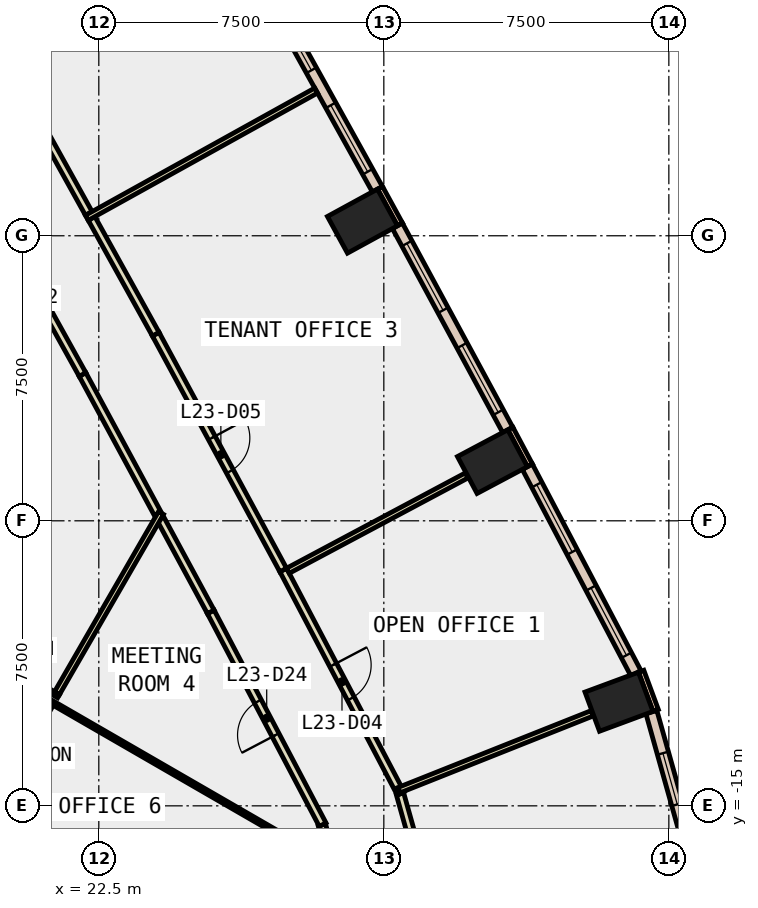
"""IFC4 building model, lengths in metres.
Left out: names, types, materials, properties, quantities, classifications, styles, units other than length and angle.
Written with IfcOpenShell. Run it as: python <this file> out.ifc"""

import sys

from ifc_helpers import new_model, si_unit, direction, frame, frame_2d, origin, origin_2d, place, context, subcontext, project, spatial, rectangle, extrude, element, fill, save


model = new_model("IFC4")
c1 = context("Model", 3, precision=1e-05, world=origin(), true_north=direction((0.0, 1.0)))
c2 = subcontext(c1, "Body", "Model", "MODEL_VIEW")
j1 = project(units=[si_unit("LENGTHUNIT", "METRE"), si_unit("PLANEANGLEUNIT", "RADIAN")], contexts=[c1])
p1 = place(None, origin())
s1 = spatial("IfcSite", under=j1, at=p1, CompositionType="ELEMENT")
p2 = place(p1, origin())
s2 = spatial("IfcBuilding", under=s1, at=p2, CompositionType="ELEMENT")
p3 = place(p2, frame((0.0, 0.0, 107.6)))
s3 = spatial("IfcBuildingStorey", under=s2, at=p3, CompositionType="ELEMENT", Elevation=107.6)
for number, where, z_axis, x_axis in (
    (1, (36.188, -12.261, -0.4), (0.0, 0.0, 1.0), (-0.347, 0.938, 0.0)),
    (2, (32.858, -5.943, -0.4), (0.0, 0.0, 1.0), (-0.469, 0.883, 0.0)),
    (3, (29.438, 0.385, -0.4), (0.0, 0.0, 1.0), (-0.48, 0.877, 0.0)),
):
    element("IfcColumn", number, at=place(p3, frame(where, z_axis=z_axis, x_axis=x_axis)), inside=s3, PredefinedType="COLUMN", context=c2, shape_type="SweptSolid", body=[
        extrude(rectangle(XDim=1.1, YDim=1.5, at=origin_2d()), origin(), (0.0, 0.0, 1.0), 4.2),
    ])
p4 = place(p3, frame((37.153, -12.49, 0.0), z_axis=(0.0, 0.0, 1.0), x_axis=(-0.347205967468, 0.937788897436, 0.0)))
e4 = element("IfcWall", 4, at=p4, inside=s3, PredefinedType="STANDARD", context=c2, shape_type="SweptSolid", body=[
    extrude(rectangle(XDim=1.1, YDim=0.15, at=frame_2d((0.55, 0.0))), origin(), (0.0, 0.0, 1.0), 3.8),
])
p5 = place(p3, frame((33.845, -6.042, 0.0), z_axis=(0.0, 0.0, 1.0), x_axis=(-0.46919310775, 0.883095593716, 0.0)))
e5 = element("IfcWall", 5, at=p5, inside=s3, PredefinedType="STANDARD", context=c2, shape_type="SweptSolid", body=[
    extrude(rectangle(XDim=1.099, YDim=0.15, at=frame_2d((0.55, 0.0))), origin(), (0.0, 0.0, 1.0), 3.8),
])
p6 = place(p3, frame((30.426, 0.298, 0.0), z_axis=(0.0, 0.0, 1.0), x_axis=(-0.479737645119, 0.877411985247, 0.0)))
e6 = element("IfcWall", 6, at=p6, inside=s3, PredefinedType="STANDARD", context=c2, shape_type="SweptSolid", body=[
    extrude(rectangle(XDim=1.101, YDim=0.15, at=frame_2d((0.55, 0.0))), origin(), (0.0, 0.0, 1.0), 3.8),
])
p7 = place(p3, frame((38.026, -16.046, 0.0), z_axis=(0.0, 0.0, 1.0), x_axis=(-0.270054089595, 0.96284515302, 0.0)))
e7 = element("IfcWall", 7, at=p7, inside=s3, PredefinedType="STANDARD", context=c2, shape_type="SweptSolid", body=[
    extrude(rectangle(XDim=3.651, YDim=0.3, at=frame_2d((1.825, 0.0))), origin(), (0.0, 0.0, 1.0), 3.8),
])
p8 = place(p7, frame((1.125, 0.0, 0.9)))
e8 = element("IfcOpeningElement", 8, at=p8, cuts=e7, PredefinedType="OPENING", context=c2, shape_type="SweptSolid", body=[
    extrude(rectangle(XDim=1.4, YDim=2.6, at=frame_2d((0.7, 1.3))), frame((0.0, 0.16, 0.0), z_axis=(0.0, -1.0, 0.0), x_axis=(1.0, 0.0, 0.0)), (0.0, 0.0, 1.0), 0.32),
])
p9 = place(p3, frame((36.633, -11.511, 0.0), z_axis=(0.0, 0.0, 1.0), x_axis=(-0.465380908665, 0.88511050714, 0.0)))
e9 = element("IfcWall", 9, at=p9, inside=s3, PredefinedType="STANDARD", context=c2, shape_type="SweptSolid", body=[
    extrude(rectangle(XDim=6.139, YDim=0.3, at=frame_2d((3.07, 0.0))), origin(), (0.0, 0.0, 1.0), 3.8),
])
p10 = place(p9, frame((0.535, 0.0, 0.9)))
e10 = element("IfcOpeningElement", 10, at=p10, cuts=e9, PredefinedType="OPENING", context=c2, shape_type="SweptSolid", body=[
    extrude(rectangle(XDim=2.0, YDim=2.6, at=frame_2d((1.0, 1.3))), frame((0.0, 0.16, 0.0), z_axis=(0.0, -1.0, 0.0), x_axis=(1.0, 0.0, 0.0)), (0.0, 0.0, 1.0), 0.32),
])
p11 = place(p9, frame((3.604, 0.0, 0.9)))
e11 = element("IfcOpeningElement", 11, at=p11, cuts=e9, PredefinedType="OPENING", context=c2, shape_type="SweptSolid", body=[
    extrude(rectangle(XDim=2.0, YDim=2.6, at=frame_2d((1.0, 1.3))), frame((0.0, 0.16, 0.0), z_axis=(0.0, -1.0, 0.0), x_axis=(1.0, 0.0, 0.0)), (0.0, 0.0, 1.0), 0.32),
])
p12 = place(p3, frame((33.26, -5.108, 0.0), z_axis=(0.0, 0.0, 1.0), x_axis=(-0.475573079782, 0.879676216449, 0.0)))
e12 = element("IfcWall", 12, at=p12, inside=s3, PredefinedType="STANDARD", context=c2, shape_type="SweptSolid", body=[
    extrude(rectangle(XDim=6.104, YDim=0.3, at=frame_2d((3.052, 0.0))), origin(), (0.0, 0.0, 1.0), 3.8),
])
p13 = place(p12, frame((0.526, 0.0, 0.9)))
e13 = element("IfcOpeningElement", 13, at=p13, cuts=e12, PredefinedType="OPENING", context=c2, shape_type="SweptSolid", body=[
    extrude(rectangle(XDim=2.0, YDim=2.6, at=frame_2d((1.0, 1.3))), frame((0.0, 0.16, 0.0), z_axis=(0.0, -1.0, 0.0), x_axis=(1.0, 0.0, 0.0)), (0.0, 0.0, 1.0), 0.32),
])
p14 = place(p12, frame((3.578, 0.0, 0.9)))
e14 = element("IfcOpeningElement", 14, at=p14, cuts=e12, PredefinedType="OPENING", context=c2, shape_type="SweptSolid", body=[
    extrude(rectangle(XDim=2.0, YDim=2.6, at=frame_2d((1.0, 1.3))), frame((0.0, 0.16, 0.0), z_axis=(0.0, -1.0, 0.0), x_axis=(1.0, 0.0, 0.0)), (0.0, 0.0, 1.0), 0.32),
])
p15 = place(p3, frame((29.83, 1.225, 0.0), z_axis=(0.0, 0.0, 1.0), x_axis=(-0.485170774404, 0.874419418623, 0.0)))
e15 = element("IfcWall", 15, at=p15, inside=s3, PredefinedType="STANDARD", context=c2, shape_type="SweptSolid", body=[
    extrude(rectangle(XDim=6.103, YDim=0.3, at=frame_2d((3.052, 0.0))), origin(), (0.0, 0.0, 1.0), 3.8),
])
p16 = place(p15, frame((0.526, 0.0, 0.9)))
e16 = element("IfcOpeningElement", 16, at=p16, cuts=e15, PredefinedType="OPENING", context=c2, shape_type="SweptSolid", body=[
    extrude(rectangle(XDim=2.0, YDim=2.6, at=frame_2d((1.0, 1.3))), frame((0.0, 0.16, 0.0), z_axis=(0.0, -1.0, 0.0), x_axis=(1.0, 0.0, 0.0)), (0.0, 0.0, 1.0), 0.32),
])
p17 = place(p15, frame((3.578, 0.0, 0.9)))
e17 = element("IfcOpeningElement", 17, at=p17, cuts=e15, PredefinedType="OPENING", context=c2, shape_type="SweptSolid", body=[
    extrude(rectangle(XDim=2.0, YDim=2.6, at=frame_2d((1.0, 1.3))), frame((0.0, 0.16, 0.0), z_axis=(0.0, -1.0, 0.0), x_axis=(1.0, 0.0, 0.0)), (0.0, 0.0, 1.0), 0.32),
])
p18 = place(p3, frame((24.051, -7.315, 0.0), z_axis=(0.0, 0.0, 1.0), x_axis=(-0.475308630647, 0.87981913234, 0.0)))
e18 = element("IfcWall", 18, at=p18, inside=s3, PredefinedType="PARTITIONING", context=c2, shape_type="SweptSolid", body=[
    extrude(rectangle(XDim=4.166, YDim=0.2, at=frame_2d((2.083, 0.0))), origin(), (0.0, 0.0, 1.0), 3.8),
])
p19 = place(p3, frame((22.071, -3.65, 0.0), z_axis=(0.0, 0.0, 1.0), x_axis=(-0.485198988697, 0.874403763354, 0.0)))
e19 = element("IfcWall", 19, at=p19, inside=s3, PredefinedType="PARTITIONING", context=c2, shape_type="SweptSolid", body=[
    extrude(rectangle(XDim=7.098, YDim=0.2, at=frame_2d((3.549, 0.0))), origin(), (0.0, 0.0, 1.0), 3.8),
])
p20 = place(p19, frame((3.049, 0.0, 0.0)))
e20 = element("IfcOpeningElement", 20, at=p20, cuts=e19, PredefinedType="OPENING", context=c2, shape_type="SweptSolid", body=[
    extrude(rectangle(XDim=1.0, YDim=2.1, at=frame_2d((0.5, 1.05))), frame((0.0, 0.11, 0.0), z_axis=(0.0, -1.0, 0.0), x_axis=(1.0, 0.0, 0.0)), (0.0, 0.0, 1.0), 0.22),
])
p21 = place(p3, frame((28.662, -16.541, 0.0), z_axis=(0.0, 0.0, 1.0), x_axis=(-0.270771802087, 0.96264356394, 0.0)))
e21 = element("IfcWall", 21, at=p21, inside=s3, PredefinedType="PARTITIONING", context=c2, shape_type="SweptSolid", body=[
    extrude(rectangle(XDim=1.078, YDim=0.2, at=frame_2d((0.539, 0.0))), origin(), (0.0, 0.0, 1.0), 3.8),
])
p22 = place(p3, frame((28.39, -15.495, 0.0), z_axis=(0.0, 0.0, 1.0), x_axis=(-0.465367816287, 0.885117390838, 0.0)))
e22 = element("IfcWall", 22, at=p22, inside=s3, PredefinedType="PARTITIONING", context=c2, shape_type="SweptSolid", body=[
    extrude(rectangle(XDim=6.326, YDim=0.2, at=frame_2d((3.163, 0.0))), origin(), (0.0, 0.0, 1.0), 3.8),
])
p23 = place(p22, frame((2.663, 0.0, 0.0)))
e23 = element("IfcOpeningElement", 23, at=p23, cuts=e22, PredefinedType="OPENING", context=c2, shape_type="SweptSolid", body=[
    extrude(rectangle(XDim=1.0, YDim=2.1, at=frame_2d((0.5, 1.05))), frame((0.0, 0.11, 0.0), z_axis=(0.0, -1.0, 0.0), x_axis=(1.0, 0.0, 0.0)), (0.0, 0.0, 1.0), 0.22),
])
p24 = place(p3, frame((25.446, -9.896, 0.0), z_axis=(0.0, 0.0, 1.0), x_axis=(-0.475427182652, 0.879755076141, 0.0)))
e24 = element("IfcWall", 24, at=p24, inside=s3, PredefinedType="PARTITIONING", context=c2, shape_type="SweptSolid", body=[
    extrude(rectangle(XDim=2.785, YDim=0.2, at=frame_2d((1.393, 0.0))), origin(), (0.0, 0.0, 1.0), 3.8),
])
p25 = place(p3, frame((30.426, -14.685, 0.0), z_axis=(0.0, 0.0, 1.0), x_axis=(0.270131711391, -0.962823378664, 0.0)))
e25 = element("IfcWall", 25, at=p25, inside=s3, PredefinedType="PARTITIONING", context=c2, shape_type="SweptSolid", body=[
    extrude(rectangle(XDim=2.166, YDim=0.2, at=frame_2d((1.083, 0.0))), origin(), (0.0, 0.0, 1.0), 3.8),
])
p26 = place(p3, frame((27.353, -8.794, 0.0), z_axis=(0.0, 0.0, 1.0), x_axis=(0.465239168813, -0.885185017836, 0.0)))
e26 = element("IfcWall", 26, at=p26, inside=s3, PredefinedType="PARTITIONING", context=c2, shape_type="SweptSolid", body=[
    extrude(rectangle(XDim=6.646, YDim=0.2, at=frame_2d((3.323, 0.0))), origin(), (0.0, 0.0, 1.0), 3.8),
])
p27 = place(p26, frame((2.823, 0.0, 0.0)))
e27 = element("IfcOpeningElement", 27, at=p27, cuts=e26, PredefinedType="OPENING", context=c2, shape_type="SweptSolid", body=[
    extrude(rectangle(XDim=1.0, YDim=2.1, at=frame_2d((0.5, 1.05))), frame((0.0, 0.11, 0.0), z_axis=(0.0, -1.0, 0.0), x_axis=(1.0, 0.0, 0.0)), (0.0, 0.0, 1.0), 0.22),
])
p28 = place(p3, frame((22.309, 0.456, 0.0), z_axis=(0.0, 0.0, 1.0), x_axis=(0.484982854201, -0.87452365956, 0.0)))
e28 = element("IfcWall", 28, at=p28, inside=s3, PredefinedType="PARTITIONING", context=c2, shape_type="SweptSolid", body=[
    extrude(rectangle(XDim=3.487, YDim=0.2, at=frame_2d((1.743, 0.0))), origin(), (0.0, 0.0, 1.0), 3.8),
])
p29 = place(p3, frame((24.0, -2.593, 0.0), z_axis=(0.0, 0.0, 1.0), x_axis=(0.475480817472, -0.879726089312, 0.0)))
e29 = element("IfcWall", 29, at=p29, inside=s3, PredefinedType="PARTITIONING", context=c2, shape_type="SweptSolid", body=[
    extrude(rectangle(XDim=7.05, YDim=0.2, at=frame_2d((3.525, 0.0))), origin(), (0.0, 0.0, 1.0), 3.8),
])
p30 = place(p29, frame((3.1, 0.0, 0.0)))
e30 = element("IfcOpeningElement", 30, at=p30, cuts=e29, PredefinedType="OPENING", context=c2, shape_type="SweptSolid", body=[
    extrude(rectangle(XDim=1.0, YDim=2.1, at=frame_2d((0.5, 1.05))), frame((0.0, 0.11, 0.0), z_axis=(0.0, -1.0, 0.0), x_axis=(1.0, 0.0, 0.0)), (0.0, 0.0, 1.0), 0.22),
])
p31 = place(p3, frame((20.544, 3.636, 0.0), z_axis=(0.0, 0.0, 1.0), x_axis=(0.485250552989, -0.874375148792, 0.0)))
e31 = element("IfcWall", 31, at=p31, inside=s3, PredefinedType="PARTITIONING", context=c2, shape_type="SweptSolid", body=[
    extrude(rectangle(XDim=3.487, YDim=0.2, at=frame_2d((1.744, 0.0))), origin(), (0.0, 0.0, 1.0), 3.8),
])
p32 = place(p3, frame((17.219, -9.676, 0.0), z_axis=(0.0, 0.0, 1.0), x_axis=(0.86598459596, -0.500070674565, 0.0)))
e32 = element("IfcWall", 32, at=p32, inside=s3, PredefinedType="PARTITIONING", context=c2, shape_type="SweptSolid", body=[
    extrude(rectangle(XDim=4.875, YDim=0.1, at=frame_2d((2.438, 0.0))), origin(), (0.0, 0.0, 1.0), 3.8),
])
p33 = place(p3, frame((21.236, -12.319, 0.0), z_axis=(0.0, 0.0, 1.0), x_axis=(-0.500016488359, -0.866015884017, 0.0)))
e33 = element("IfcWall", 33, at=p33, inside=s3, PredefinedType="PARTITIONING", context=c2, shape_type="SweptSolid", body=[
    extrude(rectangle(XDim=5.702, YDim=0.15, at=frame_2d((2.851, 0.0))), origin(), (0.0, 0.0, 1.0), 3.8),
])
p34 = place(p3, frame((24.137, -7.294, 0.0), z_axis=(0.0, 0.0, 1.0), x_axis=(-0.500001804394, -0.866024362014, 0.0)))
e34 = element("IfcWall", 34, at=p34, inside=s3, PredefinedType="PARTITIONING", context=c2, shape_type="SweptSolid", body=[
    extrude(rectangle(XDim=5.472, YDim=0.15, at=frame_2d((2.736, 0.0))), origin(), (0.0, 0.0, 1.0), 3.8),
])
p35 = place(p3, frame((21.196, -12.238, 0.0), z_axis=(0.0, 0.0, 1.0), x_axis=(0.866023145199, -0.500003911965, 0.0)))
e35 = element("IfcWall", 35, at=p35, inside=s3, PredefinedType="PARTITIONING", context=c2, shape_type="SweptSolid", body=[
    extrude(rectangle(XDim=8.71, YDim=0.1, at=frame_2d((4.355, 0.0))), origin(), (0.0, 0.0, 1.0), 3.8),
])
p36 = place(p3, frame((30.399, -14.588, 0.0), z_axis=(0.0, 0.0, 1.0), x_axis=(0.92913411584, 0.36974287658, 0.0)))
e36 = element("IfcWall", 36, at=p36, inside=s3, PredefinedType="PARTITIONING", context=c2, shape_type="SweptSolid", body=[
    extrude(rectangle(XDim=5.469, YDim=0.15, at=frame_2d((2.734, 0.0))), origin(), (0.0, 0.0, 1.0), 3.8),
])
p37 = place(p3, frame((27.476, -8.814, 0.0), z_axis=(0.0, 0.0, 1.0), x_axis=(0.882440424847, 0.47042416668, 0.0)))
e37 = element("IfcWall", 37, at=p37, inside=s3, PredefinedType="PARTITIONING", context=c2, shape_type="SweptSolid", body=[
    extrude(rectangle(XDim=5.329, YDim=0.15, at=frame_2d((2.665, 0.0))), origin(), (0.0, 0.0, 1.0), 3.8),
])
p38 = place(p3, frame((22.185, 0.473, 0.0), z_axis=(0.0, 0.0, 1.0), x_axis=(0.874372498137, 0.485255329184, 0.0)))
e38 = element("IfcWall", 38, at=p38, inside=s3, PredefinedType="PARTITIONING", context=c2, shape_type="SweptSolid", body=[
    extrude(rectangle(XDim=6.9, YDim=0.15, at=frame_2d((3.45, 0.0))), origin(), (0.0, 0.0, 1.0), 3.8),
])
p39 = place(p8, origin())
e39 = element("IfcWindow", 39, at=p39, inside=s3, PartitioningType="SINGLE_PANEL", PredefinedType="WINDOW", context=c2, shape_type="SweptSolid", body=[
    extrude(rectangle(XDim=1.4, YDim=2.6, at=frame_2d((0.7, 1.3))), frame((0.0, 0.03, 0.0), z_axis=(0.0, -1.0, 0.0), x_axis=(1.0, 0.0, 0.0)), (0.0, 0.0, 1.0), 0.06),
])
fill(e8, e39)
p40 = place(p10, origin())
e40 = element("IfcWindow", 40, at=p40, inside=s3, PartitioningType="SINGLE_PANEL", PredefinedType="WINDOW", context=c2, shape_type="SweptSolid", body=[
    extrude(rectangle(XDim=2.0, YDim=2.6, at=frame_2d((1.0, 1.3))), frame((0.0, 0.03, 0.0), z_axis=(0.0, -1.0, 0.0), x_axis=(1.0, 0.0, 0.0)), (0.0, 0.0, 1.0), 0.06),
])
fill(e10, e40)
p41 = place(p11, origin())
e41 = element("IfcWindow", 41, at=p41, inside=s3, PartitioningType="SINGLE_PANEL", PredefinedType="WINDOW", context=c2, shape_type="SweptSolid", body=[
    extrude(rectangle(XDim=2.0, YDim=2.6, at=frame_2d((1.0, 1.3))), frame((0.0, 0.03, 0.0), z_axis=(0.0, -1.0, 0.0), x_axis=(1.0, 0.0, 0.0)), (0.0, 0.0, 1.0), 0.06),
])
fill(e11, e41)
p42 = place(p13, origin())
e42 = element("IfcWindow", 42, at=p42, inside=s3, PartitioningType="SINGLE_PANEL", PredefinedType="WINDOW", context=c2, shape_type="SweptSolid", body=[
    extrude(rectangle(XDim=2.0, YDim=2.6, at=frame_2d((1.0, 1.3))), frame((0.0, 0.03, 0.0), z_axis=(0.0, -1.0, 0.0), x_axis=(1.0, 0.0, 0.0)), (0.0, 0.0, 1.0), 0.06),
])
fill(e13, e42)
p43 = place(p14, origin())
e43 = element("IfcWindow", 43, at=p43, inside=s3, PartitioningType="SINGLE_PANEL", PredefinedType="WINDOW", context=c2, shape_type="SweptSolid", body=[
    extrude(rectangle(XDim=2.0, YDim=2.6, at=frame_2d((1.0, 1.3))), frame((0.0, 0.03, 0.0), z_axis=(0.0, -1.0, 0.0), x_axis=(1.0, 0.0, 0.0)), (0.0, 0.0, 1.0), 0.06),
])
fill(e14, e43)
p44 = place(p16, origin())
e44 = element("IfcWindow", 44, at=p44, inside=s3, PartitioningType="SINGLE_PANEL", PredefinedType="WINDOW", context=c2, shape_type="SweptSolid", body=[
    extrude(rectangle(XDim=2.0, YDim=2.6, at=frame_2d((1.0, 1.3))), frame((0.0, 0.03, 0.0), z_axis=(0.0, -1.0, 0.0), x_axis=(1.0, 0.0, 0.0)), (0.0, 0.0, 1.0), 0.06),
])
fill(e16, e44)
p45 = place(p17, origin())
e45 = element("IfcWindow", 45, at=p45, inside=s3, PartitioningType="SINGLE_PANEL", PredefinedType="WINDOW", context=c2, shape_type="SweptSolid", body=[
    extrude(rectangle(XDim=2.0, YDim=2.6, at=frame_2d((1.0, 1.3))), frame((0.0, 0.03, 0.0), z_axis=(0.0, -1.0, 0.0), x_axis=(1.0, 0.0, 0.0)), (0.0, 0.0, 1.0), 0.06),
])
fill(e17, e45)
p46 = place(p27, origin())
e46 = element("IfcDoor", 46, at=p46, inside=s3, OperationType="SINGLE_SWING_LEFT", PredefinedType="DOOR", context=c2, shape_type="SweptSolid", body=[
    extrude(rectangle(XDim=1.0, YDim=2.1, at=frame_2d((0.5, 1.05))), frame((0.0, 0.025, 0.0), z_axis=(0.0, -1.0, 0.0), x_axis=(1.0, 0.0, 0.0)), (0.0, 0.0, 1.0), 0.05),
])
fill(e27, e46)
p47 = place(p30, origin())
e47 = element("IfcDoor", 47, at=p47, inside=s3, OperationType="SINGLE_SWING_LEFT", PredefinedType="DOOR", context=c2, shape_type="SweptSolid", body=[
    extrude(rectangle(XDim=1.0, YDim=2.1, at=frame_2d((0.5, 1.05))), frame((0.0, 0.025, 0.0), z_axis=(0.0, -1.0, 0.0), x_axis=(1.0, 0.0, 0.0)), (0.0, 0.0, 1.0), 0.05),
])
fill(e30, e47)
p48 = place(p23, origin())
e48 = element("IfcDoor", 48, at=p48, inside=s3, OperationType="SINGLE_SWING_LEFT", PredefinedType="DOOR", context=c2, shape_type="SweptSolid", body=[
    extrude(rectangle(XDim=1.0, YDim=2.1, at=frame_2d((0.5, 1.05))), frame((0.0, 0.025, 0.0), z_axis=(0.0, -1.0, 0.0), x_axis=(1.0, 0.0, 0.0)), (0.0, 0.0, 1.0), 0.05),
])
fill(e23, e48)
save(model, sys.argv[1])
